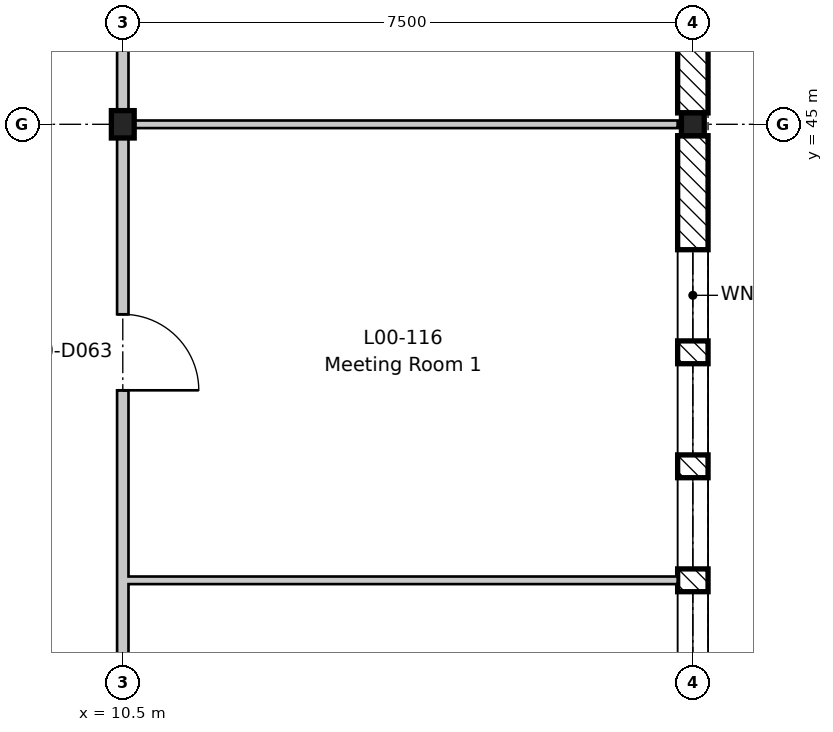
"""IFC4 building model, lengths in metres.
Left out: names, types, materials, properties, quantities, classifications, styles, units other than length and angle.
Written with IfcOpenShell. Run it as: python <this file> out.ifc"""

import sys

from ifc_helpers import new_model, si_unit, direction, frame, frame_2d, origin, origin_2d, place, context, subcontext, project, spatial, rectangle, i_section, extrude, element, fill, save


model = new_model("IFC4")
c1 = context("Model", 3, precision=1e-05, world=origin(), true_north=direction((0.0, 1.0)))
c2 = subcontext(c1, "Body", "Model", "MODEL_VIEW")
j1 = project(units=[si_unit("LENGTHUNIT", "METRE"), si_unit("PLANEANGLEUNIT", "RADIAN")], contexts=[c1])
p1 = place(None, origin())
s1 = spatial("IfcSite", under=j1, at=p1, CompositionType="ELEMENT")
p2 = place(p1, origin())
s2 = spatial("IfcBuilding", under=s1, at=p2, CompositionType="ELEMENT")
p3 = place(p2, origin())
s3 = spatial("IfcBuildingStorey", under=s2, at=p3, CompositionType="ELEMENT", Elevation=0.0)
p4 = place(p3, frame((10.5, 45.0, -0.6), z_axis=(0.0, 0.0, 1.0), x_axis=(1.0, 0.0, 0.0)))
e1 = element("IfcColumn", 1, at=p4, inside=s3, PredefinedType="COLUMN", context=c2, shape_type="SweptSolid", body=[
    extrude(i_section(OverallWidth=0.3, OverallDepth=0.36, WebThickness=0.012, FlangeThickness=0.022, FilletRadius=0.027, at=origin_2d()), origin(), (0.0, 0.0, 1.0), 5.8),
])
p5 = place(p3, frame((18.0, 45.0, -0.6), z_axis=(0.0, 0.0, 1.0), x_axis=(1.0, 0.0, 0.0)))
e2 = element("IfcColumn", 2, at=p5, inside=s3, PredefinedType="COLUMN", context=c2, shape_type="SweptSolid", body=[
    extrude(i_section(OverallWidth=0.3, OverallDepth=0.3, WebThickness=0.011, FlangeThickness=0.019, FilletRadius=0.027, at=origin_2d()), origin(), (0.0, 0.0, 1.0), 5.8),
])
p6 = place(p3, frame((18.0, 44.85, 0.0), z_axis=(0.0, 0.0, 1.0), x_axis=(0.0, -1.0, 0.0)))
e3 = element("IfcWall", 3, at=p6, inside=s3, PredefinedType="STANDARD", context=c2, shape_type="SweptSolid", body=[
    extrude(rectangle(XDim=8.7, YDim=0.4, at=frame_2d((4.35, 0.0))), origin(), (0.0, 0.0, 1.0), 4.8),
])
p7 = place(p6, frame((6.0, 0.0, 0.6)))
e4 = element("IfcOpeningElement", 4, at=p7, cuts=e3, PredefinedType="OPENING", context=c2, shape_type="SweptSolid", body=[
    extrude(rectangle(XDim=1.2, YDim=3.9, at=frame_2d((0.6, 1.95))), frame((0.0, 0.21, 0.0), z_axis=(0.0, -1.0, 0.0), x_axis=(1.0, 0.0, 0.0)), (0.0, 0.0, 1.0), 0.42),
])
p8 = place(p6, frame((4.5, 0.0, 0.6)))
e5 = element("IfcOpeningElement", 5, at=p8, cuts=e3, PredefinedType="OPENING", context=c2, shape_type="SweptSolid", body=[
    extrude(rectangle(XDim=1.2, YDim=3.9, at=frame_2d((0.6, 1.95))), frame((0.0, 0.21, 0.0), z_axis=(0.0, -1.0, 0.0), x_axis=(1.0, 0.0, 0.0)), (0.0, 0.0, 1.0), 0.42),
])
p9 = place(p6, frame((3.0, 0.0, 0.6)))
e6 = element("IfcOpeningElement", 6, at=p9, cuts=e3, PredefinedType="OPENING", context=c2, shape_type="SweptSolid", body=[
    extrude(rectangle(XDim=1.2, YDim=3.9, at=frame_2d((0.6, 1.95))), frame((0.0, 0.21, 0.0), z_axis=(0.0, -1.0, 0.0), x_axis=(1.0, 0.0, 0.0)), (0.0, 0.0, 1.0), 0.42),
])
p10 = place(p6, frame((1.5, 0.0, 0.6)))
e7 = element("IfcOpeningElement", 7, at=p10, cuts=e3, PredefinedType="OPENING", context=c2, shape_type="SweptSolid", body=[
    extrude(rectangle(XDim=1.2, YDim=3.9, at=frame_2d((0.6, 1.95))), frame((0.0, 0.21, 0.0), z_axis=(0.0, -1.0, 0.0), x_axis=(1.0, 0.0, 0.0)), (0.0, 0.0, 1.0), 0.42),
])
p11 = place(p3, frame((18.0, 53.85, 0.0), z_axis=(0.0, 0.0, 1.0), x_axis=(0.0, -1.0, 0.0)))
e8 = element("IfcWall", 8, at=p11, inside=s3, PredefinedType="STANDARD", context=c2, shape_type="SweptSolid", body=[
    extrude(rectangle(XDim=8.7, YDim=0.4, at=frame_2d((4.35, 0.0))), origin(), (0.0, 0.0, 1.0), 4.8),
])
p12 = place(p11, frame((6.0, 0.0, 0.6)))
e9 = element("IfcOpeningElement", 9, at=p12, cuts=e8, PredefinedType="OPENING", context=c2, shape_type="SweptSolid", body=[
    extrude(rectangle(XDim=1.2, YDim=3.9, at=frame_2d((0.6, 1.95))), frame((0.0, 0.21, 0.0), z_axis=(0.0, -1.0, 0.0), x_axis=(1.0, 0.0, 0.0)), (0.0, 0.0, 1.0), 0.42),
])
p13 = place(p11, frame((4.5, 0.0, 0.6)))
e10 = element("IfcOpeningElement", 10, at=p13, cuts=e8, PredefinedType="OPENING", context=c2, shape_type="SweptSolid", body=[
    extrude(rectangle(XDim=1.2, YDim=3.9, at=frame_2d((0.6, 1.95))), frame((0.0, 0.21, 0.0), z_axis=(0.0, -1.0, 0.0), x_axis=(1.0, 0.0, 0.0)), (0.0, 0.0, 1.0), 0.42),
])
p14 = place(p11, frame((3.0, 0.0, 0.6)))
e11 = element("IfcOpeningElement", 11, at=p14, cuts=e8, PredefinedType="OPENING", context=c2, shape_type="SweptSolid", body=[
    extrude(rectangle(XDim=1.2, YDim=3.9, at=frame_2d((0.6, 1.95))), frame((0.0, 0.21, 0.0), z_axis=(0.0, -1.0, 0.0), x_axis=(1.0, 0.0, 0.0)), (0.0, 0.0, 1.0), 0.42),
])
p15 = place(p11, frame((1.5, 0.0, 0.6)))
e12 = element("IfcOpeningElement", 12, at=p15, cuts=e8, PredefinedType="OPENING", context=c2, shape_type="SweptSolid", body=[
    extrude(rectangle(XDim=1.2, YDim=3.9, at=frame_2d((0.6, 1.95))), frame((0.0, 0.21, 0.0), z_axis=(0.0, -1.0, 0.0), x_axis=(1.0, 0.0, 0.0)), (0.0, 0.0, 1.0), 0.42),
])
p16 = place(p3, frame((10.575, 39.0, 0.0), z_axis=(0.0, 0.0, 1.0), x_axis=(1.0, 0.0, 0.0)))
e13 = element("IfcWall", 13, at=p16, inside=s3, PredefinedType="PARTITIONING", context=c2, shape_type="SweptSolid", body=[
    extrude(rectangle(XDim=7.225, YDim=0.1, at=frame_2d((3.613, 0.0))), origin(), (0.0, 0.0, 1.0), 5.2),
])
p17 = place(p3, frame((10.575, 45.0, 0.0), z_axis=(0.0, 0.0, 1.0), x_axis=(1.0, 0.0, 0.0)))
e14 = element("IfcWall", 14, at=p17, inside=s3, PredefinedType="PARTITIONING", context=c2, shape_type="SweptSolid", body=[
    extrude(rectangle(XDim=7.225, YDim=0.1, at=frame_2d((3.613, 0.0))), origin(), (0.0, 0.0, 1.0), 4.85),
])
p18 = place(p3, frame((10.5, 0.0, 0.0), z_axis=(0.0, 0.0, 1.0), x_axis=(0.0, 1.0, 0.0)))
e15 = element("IfcWall", 15, at=p18, inside=s3, PredefinedType="PARTITIONING", context=c2, shape_type="SweptSolid", body=[
    extrude(rectangle(XDim=70.5, YDim=0.15, at=frame_2d((35.25, 0.0))), origin(), (0.0, 0.0, 1.0), 4.68),
])
p19 = place(p18, frame((1.0, 0.0, 0.0)))
e16 = element("IfcOpeningElement", 16, at=p19, cuts=e15, PredefinedType="OPENING", context=c2, shape_type="SweptSolid", body=[
    extrude(rectangle(XDim=1.0, YDim=2.1, at=frame_2d((0.5, 1.05))), frame((0.0, 0.085, 0.0), z_axis=(0.0, -1.0, 0.0), x_axis=(1.0, 0.0, 0.0)), (0.0, 0.0, 1.0), 0.17),
])
p20 = place(p18, frame((5.5, 0.0, 0.0)))
e17 = element("IfcOpeningElement", 17, at=p20, cuts=e15, PredefinedType="OPENING", context=c2, shape_type="SweptSolid", body=[
    extrude(rectangle(XDim=1.0, YDim=2.1, at=frame_2d((0.5, 1.05))), frame((0.0, 0.085, 0.0), z_axis=(0.0, -1.0, 0.0), x_axis=(1.0, 0.0, 0.0)), (0.0, 0.0, 1.0), 0.17),
])
p21 = place(p18, frame((11.5, 0.0, 0.0)))
e18 = element("IfcOpeningElement", 18, at=p21, cuts=e15, PredefinedType="OPENING", context=c2, shape_type="SweptSolid", body=[
    extrude(rectangle(XDim=1.0, YDim=2.1, at=frame_2d((0.5, 1.05))), frame((0.0, 0.085, 0.0), z_axis=(0.0, -1.0, 0.0), x_axis=(1.0, 0.0, 0.0)), (0.0, 0.0, 1.0), 0.17),
])
p22 = place(p18, frame((18.8, 0.0, 0.0)))
e19 = element("IfcOpeningElement", 19, at=p22, cuts=e15, PredefinedType="OPENING", context=c2, shape_type="SweptSolid", body=[
    extrude(rectangle(XDim=1.4, YDim=2.1, at=frame_2d((0.7, 1.05))), frame((0.0, 0.085, 0.0), z_axis=(0.0, -1.0, 0.0), x_axis=(1.0, 0.0, 0.0)), (0.0, 0.0, 1.0), 0.17),
])
p23 = place(p18, frame((25.0, 0.0, 0.0)))
e20 = element("IfcOpeningElement", 20, at=p23, cuts=e15, PredefinedType="OPENING", context=c2, shape_type="SweptSolid", body=[
    extrude(rectangle(XDim=1.0, YDim=2.1, at=frame_2d((0.5, 1.05))), frame((0.0, 0.085, 0.0), z_axis=(0.0, -1.0, 0.0), x_axis=(1.0, 0.0, 0.0)), (0.0, 0.0, 1.0), 0.17),
])
p24 = place(p18, frame((28.0, 0.0, 0.0)))
e21 = element("IfcOpeningElement", 21, at=p24, cuts=e15, PredefinedType="OPENING", context=c2, shape_type="SweptSolid", body=[
    extrude(rectangle(XDim=1.0, YDim=2.1, at=frame_2d((0.5, 1.05))), frame((0.0, 0.085, 0.0), z_axis=(0.0, -1.0, 0.0), x_axis=(1.0, 0.0, 0.0)), (0.0, 0.0, 1.0), 0.17),
])
p25 = place(p18, frame((33.8, 0.0, 0.0)))
e22 = element("IfcOpeningElement", 22, at=p25, cuts=e15, PredefinedType="OPENING", context=c2, shape_type="SweptSolid", body=[
    extrude(rectangle(XDim=1.4, YDim=2.1, at=frame_2d((0.7, 1.05))), frame((0.0, 0.085, 0.0), z_axis=(0.0, -1.0, 0.0), x_axis=(1.0, 0.0, 0.0)), (0.0, 0.0, 1.0), 0.17),
])
p26 = place(p18, frame((41.5, 0.0, 0.0)))
e23 = element("IfcOpeningElement", 23, at=p26, cuts=e15, PredefinedType="OPENING", context=c2, shape_type="SweptSolid", body=[
    extrude(rectangle(XDim=1.0, YDim=2.1, at=frame_2d((0.5, 1.05))), frame((0.0, 0.085, 0.0), z_axis=(0.0, -1.0, 0.0), x_axis=(1.0, 0.0, 0.0)), (0.0, 0.0, 1.0), 0.17),
])
p27 = place(p18, frame((46.0, 0.0, 0.0)))
e24 = element("IfcOpeningElement", 24, at=p27, cuts=e15, PredefinedType="OPENING", context=c2, shape_type="SweptSolid", body=[
    extrude(rectangle(XDim=1.0, YDim=2.1, at=frame_2d((0.5, 1.05))), frame((0.0, 0.085, 0.0), z_axis=(0.0, -1.0, 0.0), x_axis=(1.0, 0.0, 0.0)), (0.0, 0.0, 1.0), 0.17),
])
p28 = place(p18, frame((49.0, 0.0, 0.0)))
e25 = element("IfcOpeningElement", 25, at=p28, cuts=e15, PredefinedType="OPENING", context=c2, shape_type="SweptSolid", body=[
    extrude(rectangle(XDim=1.0, YDim=2.1, at=frame_2d((0.5, 1.05))), frame((0.0, 0.085, 0.0), z_axis=(0.0, -1.0, 0.0), x_axis=(1.0, 0.0, 0.0)), (0.0, 0.0, 1.0), 0.17),
])
p29 = place(p18, frame((54.75, 0.0, 0.0)))
e26 = element("IfcOpeningElement", 26, at=p29, cuts=e15, PredefinedType="OPENING", context=c2, shape_type="SweptSolid", body=[
    extrude(rectangle(XDim=1.0, YDim=2.1, at=frame_2d((0.5, 1.05))), frame((0.0, 0.085, 0.0), z_axis=(0.0, -1.0, 0.0), x_axis=(1.0, 0.0, 0.0)), (0.0, 0.0, 1.0), 0.17),
])
p30 = place(p18, frame((58.0, 0.0, 0.0)))
e27 = element("IfcOpeningElement", 27, at=p30, cuts=e15, PredefinedType="OPENING", context=c2, shape_type="SweptSolid", body=[
    extrude(rectangle(XDim=1.0, YDim=2.1, at=frame_2d((0.5, 1.05))), frame((0.0, 0.085, 0.0), z_axis=(0.0, -1.0, 0.0), x_axis=(1.0, 0.0, 0.0)), (0.0, 0.0, 1.0), 0.17),
])
p31 = place(p18, frame((61.0, 0.0, 0.0)))
e28 = element("IfcOpeningElement", 28, at=p31, cuts=e15, PredefinedType="OPENING", context=c2, shape_type="SweptSolid", body=[
    extrude(rectangle(XDim=1.0, YDim=2.1, at=frame_2d((0.5, 1.05))), frame((0.0, 0.085, 0.0), z_axis=(0.0, -1.0, 0.0), x_axis=(1.0, 0.0, 0.0)), (0.0, 0.0, 1.0), 0.17),
])
p32 = place(p18, frame((64.0, 0.0, 0.0)))
e29 = element("IfcOpeningElement", 29, at=p32, cuts=e15, PredefinedType="OPENING", context=c2, shape_type="SweptSolid", body=[
    extrude(rectangle(XDim=1.0, YDim=2.1, at=frame_2d((0.5, 1.05))), frame((0.0, 0.085, 0.0), z_axis=(0.0, -1.0, 0.0), x_axis=(1.0, 0.0, 0.0)), (0.0, 0.0, 1.0), 0.17),
])
p33 = place(p7, origin())
e30 = element("IfcWindow", 30, at=p33, inside=s3, PartitioningType="SINGLE_PANEL", PredefinedType="WINDOW", context=c2, shape_type="SweptSolid", body=[
    extrude(rectangle(XDim=1.2, YDim=3.9, at=frame_2d((0.6, 1.95))), frame((0.0, 0.03, 0.0), z_axis=(0.0, -1.0, 0.0), x_axis=(1.0, 0.0, 0.0)), (0.0, 0.0, 1.0), 0.06),
])
fill(e4, e30)
p34 = place(p8, origin())
e31 = element("IfcWindow", 31, at=p34, inside=s3, PartitioningType="SINGLE_PANEL", PredefinedType="WINDOW", context=c2, shape_type="SweptSolid", body=[
    extrude(rectangle(XDim=1.2, YDim=3.9, at=frame_2d((0.6, 1.95))), frame((0.0, 0.03, 0.0), z_axis=(0.0, -1.0, 0.0), x_axis=(1.0, 0.0, 0.0)), (0.0, 0.0, 1.0), 0.06),
])
fill(e5, e31)
p35 = place(p9, origin())
e32 = element("IfcWindow", 32, at=p35, inside=s3, PartitioningType="SINGLE_PANEL", PredefinedType="WINDOW", context=c2, shape_type="SweptSolid", body=[
    extrude(rectangle(XDim=1.2, YDim=3.9, at=frame_2d((0.6, 1.95))), frame((0.0, 0.03, 0.0), z_axis=(0.0, -1.0, 0.0), x_axis=(1.0, 0.0, 0.0)), (0.0, 0.0, 1.0), 0.06),
])
fill(e6, e32)
p36 = place(p10, origin())
e33 = element("IfcWindow", 33, at=p36, inside=s3, PartitioningType="SINGLE_PANEL", PredefinedType="WINDOW", context=c2, shape_type="SweptSolid", body=[
    extrude(rectangle(XDim=1.2, YDim=3.9, at=frame_2d((0.6, 1.95))), frame((0.0, 0.03, 0.0), z_axis=(0.0, -1.0, 0.0), x_axis=(1.0, 0.0, 0.0)), (0.0, 0.0, 1.0), 0.06),
])
fill(e7, e33)
p37 = place(p26, frame((1.0, 0.0, 0.0), z_axis=(0.0, 0.0, 1.0), x_axis=(-1.0, 0.0, 0.0)))
e34 = element("IfcDoor", 34, at=p37, inside=s3, OperationType="SINGLE_SWING_RIGHT", PredefinedType="DOOR", context=c2, shape_type="SweptSolid", body=[
    extrude(rectangle(XDim=1.0, YDim=2.1, at=frame_2d((0.5, 1.05))), frame((0.0, 0.025, 0.0), z_axis=(0.0, -1.0, 0.0), x_axis=(1.0, 0.0, 0.0)), (0.0, 0.0, 1.0), 0.05),
])
fill(e23, e34)
save(model, sys.argv[1])
